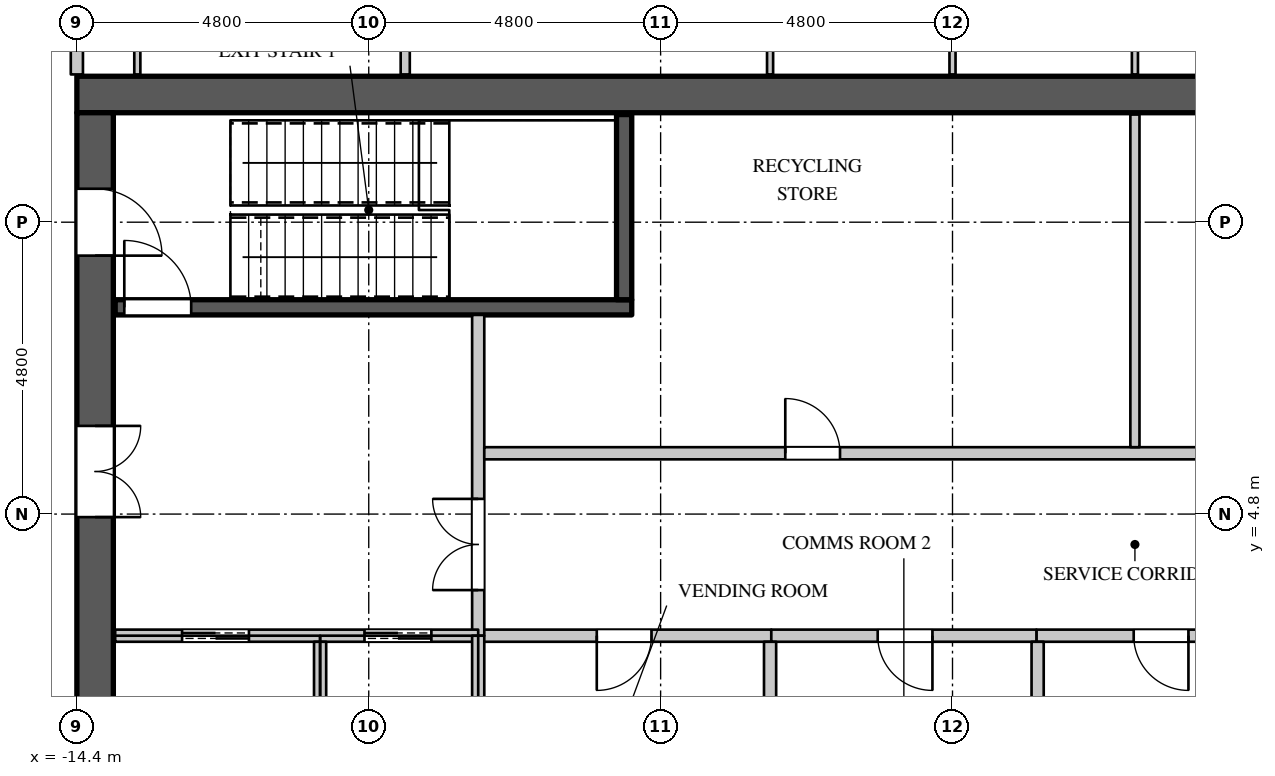
"""IFC4 building model, lengths in metres.
Left out: names, types, materials, properties, quantities, classifications, styles, units other than length and angle.
Written with IfcOpenShell. Run it as: python <this file> out.ifc"""

import sys

from ifc_helpers import new_model, si_unit, direction, frame, frame_2d, origin, place, context, subcontext, project, spatial, rectangle, extrude, element, fill, save


model = new_model("IFC4")
c1 = context("Model", 3, precision=1e-05, world=origin(), true_north=direction((0.0, 1.0)))
c2 = subcontext(c1, "Body", "Model", "MODEL_VIEW")
j1 = project(units=[si_unit("LENGTHUNIT", "METRE"), si_unit("PLANEANGLEUNIT", "RADIAN")], contexts=[c1])
p1 = place(None, origin())
s1 = spatial("IfcSite", under=j1, at=p1, CompositionType="ELEMENT")
p2 = place(p1, origin())
s2 = spatial("IfcBuilding", under=s1, at=p2, CompositionType="ELEMENT")
p3 = place(p2, frame((0.0, 0.0, 213.9)))
s3 = spatial("IfcBuildingStorey", under=s2, at=p3, CompositionType="ELEMENT", Elevation=213.9)
p4 = place(p3, frame((-14.4, 11.7, 0.0), z_axis=(0.0, 0.0, 1.0), x_axis=(1.0, 0.0, 0.0)))
e1 = element("IfcWall", 1, at=p4, inside=s3, PredefinedType="SHEAR", context=c2, shape_type="SweptSolid", body=[
    extrude(rectangle(XDim=28.8, YDim=0.6, at=frame_2d((14.4, 0.0))), origin(), (0.0, 0.0, 1.0), 4.2),
])
p5 = place(p3, frame((-14.1, -11.4, 0.0), z_axis=(0.0, 0.0, 1.0), x_axis=(0.0, 1.0, 0.0)))
e2 = element("IfcWall", 2, at=p5, inside=s3, PredefinedType="SHEAR", context=c2, shape_type="SweptSolid", body=[
    extrude(rectangle(XDim=22.8, YDim=0.6, at=frame_2d((11.4, 0.0))), origin(), (0.0, 0.0, 1.0), 4.2),
])
p6 = place(p5, frame((20.45, 0.0, 0.0)))
e3 = element("IfcOpeningElement", 3, at=p6, cuts=e2, PredefinedType="OPENING", context=c2, shape_type="SweptSolid", body=[
    extrude(rectangle(XDim=1.1, YDim=2.2, at=frame_2d((0.55, 1.1))), frame((0.0, 0.31, 0.0), z_axis=(0.0, -1.0, 0.0), x_axis=(1.0, 0.0, 0.0)), (0.0, 0.0, 1.0), 0.62),
])
p7 = place(p5, frame((1.25, 0.0, 0.0)))
e4 = element("IfcOpeningElement", 4, at=p7, cuts=e2, PredefinedType="OPENING", context=c2, shape_type="SweptSolid", body=[
    extrude(rectangle(XDim=1.1, YDim=2.2, at=frame_2d((0.55, 1.1))), frame((0.0, 0.31, 0.0), z_axis=(0.0, -1.0, 0.0), x_axis=(1.0, 0.0, 0.0)), (0.0, 0.0, 1.0), 0.62),
])
p8 = place(p5, frame((16.15, 0.0, 0.0)))
e5 = element("IfcOpeningElement", 5, at=p8, cuts=e2, PredefinedType="OPENING", context=c2, shape_type="SweptSolid", body=[
    extrude(rectangle(XDim=1.5, YDim=2.4, at=frame_2d((0.75, 1.2))), frame((0.0, 0.31, 0.0), z_axis=(0.0, -1.0, 0.0), x_axis=(1.0, 0.0, 0.0)), (0.0, 0.0, 1.0), 0.62),
])
p9 = place(p5, frame((5.15, 0.0, 0.0)))
e6 = element("IfcOpeningElement", 6, at=p9, cuts=e2, PredefinedType="OPENING", context=c2, shape_type="SweptSolid", body=[
    extrude(rectangle(XDim=1.5, YDim=2.4, at=frame_2d((0.75, 1.2))), frame((0.0, 0.31, 0.0), z_axis=(0.0, -1.0, 0.0), x_axis=(1.0, 0.0, 0.0)), (0.0, 0.0, 1.0), 0.62),
])
p10 = place(p3, frame((-14.4, 12.03, 0.0), z_axis=(0.0, 0.0, 1.0), x_axis=(0.0, 1.0, 0.0)))
e7 = element("IfcWall", 7, at=p10, inside=s3, PredefinedType="PARTITIONING", context=c2, shape_type="SweptSolid", body=[
    extrude(rectangle(XDim=2.27, YDim=0.2, at=frame_2d((1.135, 0.0))), origin(), (0.0, 0.0, 1.0), 3.95),
])
p11 = place(p3, frame((-7.8, 2.8, 0.0), z_axis=(0.0, 0.0, 1.0), x_axis=(1.0, 0.0, 0.0)))
e8 = element("IfcWall", 8, at=p11, inside=s3, PredefinedType="PARTITIONING", context=c2, shape_type="SweptSolid", body=[
    extrude(rectangle(XDim=4.82, YDim=0.2, at=frame_2d((2.41, 0.0))), origin(), (0.0, 0.0, 1.0), 3.95),
])
p12 = place(p11, frame((1.95, 0.0, 0.0)))
e9 = element("IfcOpeningElement", 9, at=p12, cuts=e8, PredefinedType="OPENING", context=c2, shape_type="SweptSolid", body=[
    extrude(rectangle(XDim=0.9, YDim=2.2, at=frame_2d((0.45, 1.1))), frame((0.0, 0.11, 0.0), z_axis=(0.0, -1.0, 0.0), x_axis=(1.0, 0.0, 0.0)), (0.0, 0.0, 1.0), 0.22),
])
p13 = place(p3, frame((-7.8, 2.8, 0.0), z_axis=(0.0, 0.0, 1.0), x_axis=(0.0, 1.0, 0.0)))
e10 = element("IfcWall", 10, at=p13, inside=s3, PredefinedType="PARTITIONING", context=c2, shape_type="SweptSolid", body=[
    extrude(rectangle(XDim=5.275, YDim=0.2, at=frame_2d((2.637, 0.0))), origin(), (0.0, 0.0, 1.0), 3.95),
])
p14 = place(p13, frame((0.75, 0.0, 0.0)))
e11 = element("IfcOpeningElement", 11, at=p14, cuts=e10, PredefinedType="OPENING", context=c2, shape_type="SweptSolid", body=[
    extrude(rectangle(XDim=1.5, YDim=2.4, at=frame_2d((0.75, 1.2))), frame((0.0, 0.11, 0.0), z_axis=(0.0, -1.0, 0.0), x_axis=(1.0, 0.0, 0.0)), (0.0, 0.0, 1.0), 0.22),
])
p15 = place(p3, frame((-7.7, 5.8, 0.0), z_axis=(0.0, 0.0, 1.0), x_axis=(1.0, 0.0, 0.0)))
e12 = element("IfcWall", 12, at=p15, inside=s3, PredefinedType="PARTITIONING", context=c2, shape_type="SweptSolid", body=[
    extrude(rectangle(XDim=21.47, YDim=0.2, at=frame_2d((10.735, 0.0))), origin(), (0.0, 0.0, 1.0), 3.95),
])
p16 = place(p15, frame((4.95, 0.0, 0.0)))
e13 = element("IfcOpeningElement", 13, at=p16, cuts=e12, PredefinedType="OPENING", context=c2, shape_type="SweptSolid", body=[
    extrude(rectangle(XDim=0.9, YDim=2.2, at=frame_2d((0.45, 1.1))), frame((0.0, 0.11, 0.0), z_axis=(0.0, -1.0, 0.0), x_axis=(1.0, 0.0, 0.0)), (0.0, 0.0, 1.0), 0.22),
])
p17 = place(p15, frame((15.55, 0.0, 0.0)))
e14 = element("IfcOpeningElement", 14, at=p17, cuts=e12, PredefinedType="OPENING", context=c2, shape_type="SweptSolid", body=[
    extrude(rectangle(XDim=0.9, YDim=2.2, at=frame_2d((0.45, 1.1))), frame((0.0, 0.11, 0.0), z_axis=(0.0, -1.0, 0.0), x_axis=(1.0, 0.0, 0.0)), (0.0, 0.0, 1.0), 0.22),
])
p18 = place(p3, frame((1.38, 2.8, 0.0), z_axis=(0.0, 0.0, 1.0), x_axis=(1.0, 0.0, 0.0)))
e15 = element("IfcWall", 15, at=p18, inside=s3, PredefinedType="PARTITIONING", context=c2, shape_type="SweptSolid", body=[
    extrude(rectangle(XDim=9.04, YDim=0.2, at=frame_2d((4.52, 0.0))), origin(), (0.0, 0.0, 1.0), 3.95),
])
p19 = place(p18, frame((1.6, 0.0, 0.0)))
e16 = element("IfcOpeningElement", 16, at=p19, cuts=e15, PredefinedType="OPENING", context=c2, shape_type="SweptSolid", body=[
    extrude(rectangle(XDim=0.9, YDim=2.2, at=frame_2d((0.45, 1.1))), frame((0.0, 0.11, 0.0), z_axis=(0.0, -1.0, 0.0), x_axis=(1.0, 0.0, 0.0)), (0.0, 0.0, 1.0), 0.22),
])
p20 = place(p18, frame((6.0, 0.0, 0.0)))
e17 = element("IfcOpeningElement", 17, at=p20, cuts=e15, PredefinedType="OPENING", context=c2, shape_type="SweptSolid", body=[
    extrude(rectangle(XDim=0.9, YDim=2.2, at=frame_2d((0.45, 1.1))), frame((0.0, 0.11, 0.0), z_axis=(0.0, -1.0, 0.0), x_axis=(1.0, 0.0, 0.0)), (0.0, 0.0, 1.0), 0.22),
])
p21 = place(p3, frame((-9.0, 12.03, 0.0), z_axis=(0.0, 0.0, 1.0), x_axis=(0.0, 1.0, 0.0)))
e18 = element("IfcWall", 18, at=p21, inside=s3, PredefinedType="PARTITIONING", context=c2, shape_type="SweptSolid", body=[
    extrude(rectangle(XDim=6.395, YDim=0.15, at=frame_2d((3.198, 0.0))), origin(), (0.0, 0.0, 1.0), 3.95),
])
p22 = place(p3, frame((3.0, 5.9, 0.0), z_axis=(0.0, 0.0, 1.0), x_axis=(0.0, 1.0, 0.0)))
e19 = element("IfcWall", 19, at=p22, inside=s3, PredefinedType="PARTITIONING", context=c2, shape_type="SweptSolid", body=[
    extrude(rectangle(XDim=5.47, YDim=0.15, at=frame_2d((2.735, 0.0))), origin(), (0.0, 0.0, 1.0), 3.95),
])
p23 = place(p3, frame((-2.98, 2.8, 0.0), z_axis=(0.0, 0.0, 1.0), x_axis=(1.0, 0.0, 0.0)))
e20 = element("IfcWall", 20, at=p23, inside=s3, PredefinedType="PARTITIONING", context=c2, shape_type="SweptSolid", body=[
    extrude(rectangle(XDim=4.36, YDim=0.2, at=frame_2d((2.18, 0.0))), origin(), (0.0, 0.0, 1.0), 3.95),
])
p24 = place(p23, frame((1.75, 0.0, 0.0)))
e21 = element("IfcOpeningElement", 21, at=p24, cuts=e20, PredefinedType="OPENING", context=c2, shape_type="SweptSolid", body=[
    extrude(rectangle(XDim=0.9, YDim=2.2, at=frame_2d((0.45, 1.1))), frame((0.0, 0.11, 0.0), z_axis=(0.0, -1.0, 0.0), x_axis=(1.0, 0.0, 0.0)), (0.0, 0.0, 1.0), 0.22),
])
for number, where, z_axis, x_axis in (
    (22, (-3.0, 0.1, 0.0), (0.0, 0.0, 1.0), (0.0, 1.0, 0.0)),
    (23, (1.4, 0.1, 0.0), (0.0, 0.0, 1.0), (0.0, 1.0, 0.0)),
):
    element("IfcWall", number, at=place(p3, frame(where, z_axis=z_axis, x_axis=x_axis)), inside=s3, PredefinedType="PARTITIONING", context=c2, shape_type="SweptSolid", body=[
        extrude(rectangle(XDim=2.6, YDim=0.2, at=frame_2d((1.3, 0.0))), origin(), (0.0, 0.0, 1.0), 3.95),
    ])
p25 = place(p3, frame((-13.77, 2.8, 0.0), z_axis=(0.0, 0.0, 1.0), x_axis=(1.0, 0.0, 0.0)))
e24 = element("IfcWall", 24, at=p25, inside=s3, PredefinedType="PARTITIONING", context=c2, shape_type="SweptSolid", body=[
    extrude(rectangle(XDim=5.97, YDim=0.2, at=frame_2d((2.985, 0.0))), origin(), (0.0, 0.0, 1.0), 3.95),
])
p26 = place(p25, frame((1.1, 0.0, 0.0)))
e25 = element("IfcOpeningElement", 25, at=p26, cuts=e24, PredefinedType="OPENING", context=c2, shape_type="SweptSolid", body=[
    extrude(rectangle(XDim=1.1, YDim=2.2, at=frame_2d((0.55, 1.1))), frame((0.0, 0.11, 0.0), z_axis=(0.0, -1.0, 0.0), x_axis=(1.0, 0.0, 0.0)), (0.0, 0.0, 1.0), 0.22),
])
p27 = place(p25, frame((4.1, 0.0, 0.0)))
e26 = element("IfcOpeningElement", 26, at=p27, cuts=e24, PredefinedType="OPENING", context=c2, shape_type="SweptSolid", body=[
    extrude(rectangle(XDim=1.1, YDim=2.2, at=frame_2d((0.55, 1.1))), frame((0.0, 0.11, 0.0), z_axis=(0.0, -1.0, 0.0), x_axis=(1.0, 0.0, 0.0)), (0.0, 0.0, 1.0), 0.22),
])
p28 = place(p3, frame((-10.4, 0.0, 0.0), z_axis=(0.0, 0.0, 1.0), x_axis=(0.0, 1.0, 0.0)))
e27 = element("IfcWall", 27, at=p28, inside=s3, PredefinedType="PARTITIONING", context=c2, shape_type="SweptSolid", body=[
    extrude(rectangle(XDim=2.7, YDim=0.2, at=frame_2d((1.35, 0.0))), origin(), (0.0, 0.0, 1.0), 3.95),
])
p29 = place(p3, frame((-7.8, 0.0, 0.0), z_axis=(0.0, 0.0, 1.0), x_axis=(0.0, 1.0, 0.0)))
e28 = element("IfcWall", 28, at=p29, inside=s3, PredefinedType="PARTITIONING", context=c2, shape_type="SweptSolid", body=[
    extrude(rectangle(XDim=2.8, YDim=0.2, at=frame_2d((1.4, 0.0))), origin(), (0.0, 0.0, 1.0), 3.95),
])
p30 = place(p3, frame((-13.77, 8.2, 0.0), z_axis=(0.0, 0.0, 1.0), x_axis=(1.0, 0.0, 0.0)))
e29 = element("IfcWall", 29, at=p30, inside=s3, PredefinedType="SHEAR", context=c2, shape_type="SweptSolid", body=[
    extrude(rectangle(XDim=8.495, YDim=0.25, at=frame_2d((4.248, 0.0))), origin(), (0.0, 0.0, 1.0), 3.95),
])
p31 = place(p30, frame((0.15, 0.0, 0.0)))
e30 = element("IfcOpeningElement", 30, at=p31, cuts=e29, PredefinedType="OPENING", context=c2, shape_type="SweptSolid", body=[
    extrude(rectangle(XDim=1.1, YDim=2.2, at=frame_2d((0.55, 1.1))), frame((0.0, 0.135, 0.0), z_axis=(0.0, -1.0, 0.0), x_axis=(1.0, 0.0, 0.0)), (0.0, 0.0, 1.0), 0.27),
])
p32 = place(p3, frame((-5.4, 8.325, 0.0), z_axis=(0.0, 0.0, 1.0), x_axis=(0.0, 1.0, 0.0)))
e31 = element("IfcWall", 31, at=p32, inside=s3, PredefinedType="SHEAR", context=c2, shape_type="SweptSolid", body=[
    extrude(rectangle(XDim=3.045, YDim=0.25, at=frame_2d((1.522, 0.0))), origin(), (0.0, 0.0, 1.0), 3.95),
])
p33 = place(p3, frame((-13.406, 12.03, 0.0), z_axis=(0.0, 0.0, 1.0), x_axis=(0.0, 1.0, 0.0)))
e32 = element("IfcWall", 32, at=p33, inside=s3, PredefinedType="PARTITIONING", context=c2, shape_type="SweptSolid", body=[
    extrude(rectangle(XDim=4.57, YDim=0.1, at=frame_2d((2.285, 0.0))), origin(), (0.0, 0.0, 1.0), 3.3),
])
p34 = place(p3, frame((-3.0, 12.03, 0.0), z_axis=(0.0, 0.0, 1.0), x_axis=(0.0, 1.0, 0.0)))
e33 = element("IfcWall", 33, at=p34, inside=s3, PredefinedType="PARTITIONING", context=c2, shape_type="SweptSolid", body=[
    extrude(rectangle(XDim=6.42, YDim=0.1, at=frame_2d((3.21, 0.0))), origin(), (0.0, 0.0, 1.0), 3.95),
])
p35 = place(p34, frame((2.75, 0.0, 0.0)))
e34 = element("IfcOpeningElement", 34, at=p35, cuts=e33, PredefinedType="OPENING", context=c2, shape_type="SweptSolid", body=[
    extrude(rectangle(XDim=0.9, YDim=2.2, at=frame_2d((0.45, 1.1))), frame((0.0, 0.06, 0.0), z_axis=(0.0, -1.0, 0.0), x_axis=(1.0, 0.0, 0.0)), (0.0, 0.0, 1.0), 0.12),
])
p36 = place(p3, frame((0.0, 12.03, 0.0), z_axis=(0.0, 0.0, 1.0), x_axis=(0.0, 1.0, 0.0)))
e35 = element("IfcWall", 35, at=p36, inside=s3, PredefinedType="PARTITIONING", context=c2, shape_type="SweptSolid", body=[
    extrude(rectangle(XDim=6.395, YDim=0.1, at=frame_2d((3.198, 0.0))), origin(), (0.0, 0.0, 1.0), 3.95),
])
p37 = place(p36, frame((2.75, 0.0, 0.0)))
e36 = element("IfcOpeningElement", 36, at=p37, cuts=e35, PredefinedType="OPENING", context=c2, shape_type="SweptSolid", body=[
    extrude(rectangle(XDim=0.9, YDim=2.2, at=frame_2d((0.45, 1.1))), frame((0.0, 0.06, 0.0), z_axis=(0.0, -1.0, 0.0), x_axis=(1.0, 0.0, 0.0)), (0.0, 0.0, 1.0), 0.12),
])
p38 = place(p3, frame((3.0, 12.03, 0.0), z_axis=(0.0, 0.0, 1.0), x_axis=(0.0, 1.0, 0.0)))
e37 = element("IfcWall", 37, at=p38, inside=s3, PredefinedType="PARTITIONING", context=c2, shape_type="SweptSolid", body=[
    extrude(rectangle(XDim=6.42, YDim=0.1, at=frame_2d((3.21, 0.0))), origin(), (0.0, 0.0, 1.0), 3.95),
])
p39 = place(p16, origin())
e38 = element("IfcDoor", 38, at=p39, inside=s3, OperationType="SINGLE_SWING_LEFT", PredefinedType="DOOR", context=c2, shape_type="SweptSolid", body=[
    extrude(rectangle(XDim=0.9, YDim=2.2, at=frame_2d((0.45, 1.1))), frame((0.0, 0.025, 0.0), z_axis=(0.0, -1.0, 0.0), x_axis=(1.0, 0.0, 0.0)), (0.0, 0.0, 1.0), 0.05),
])
fill(e13, e38)
p40 = place(p12, origin())
e39 = element("IfcDoor", 39, at=p40, inside=s3, OperationType="SINGLE_SWING_RIGHT", PredefinedType="DOOR", context=c2, shape_type="SweptSolid", body=[
    extrude(rectangle(XDim=0.9, YDim=2.2, at=frame_2d((0.45, 1.1))), frame((0.0, 0.025, 0.0), z_axis=(0.0, -1.0, 0.0), x_axis=(1.0, 0.0, 0.0)), (0.0, 0.0, 1.0), 0.05),
])
fill(e9, e39)
p41 = place(p24, origin())
e40 = element("IfcDoor", 40, at=p41, inside=s3, OperationType="SINGLE_SWING_LEFT", PredefinedType="DOOR", context=c2, shape_type="SweptSolid", body=[
    extrude(rectangle(XDim=0.9, YDim=2.2, at=frame_2d((0.45, 1.1))), frame((0.0, 0.025, 0.0), z_axis=(0.0, -1.0, 0.0), x_axis=(1.0, 0.0, 0.0)), (0.0, 0.0, 1.0), 0.05),
])
fill(e21, e40)
p42 = place(p19, origin())
e41 = element("IfcDoor", 41, at=p42, inside=s3, OperationType="SINGLE_SWING_LEFT", PredefinedType="DOOR", context=c2, shape_type="SweptSolid", body=[
    extrude(rectangle(XDim=0.9, YDim=2.2, at=frame_2d((0.45, 1.1))), frame((0.0, 0.025, 0.0), z_axis=(0.0, -1.0, 0.0), x_axis=(1.0, 0.0, 0.0)), (0.0, 0.0, 1.0), 0.05),
])
fill(e16, e41)
p43 = place(p26, origin())
e42 = element("IfcDoor", 42, at=p43, inside=s3, OperationType="DOUBLE_DOOR_SLIDING", PredefinedType="DOOR", context=c2, shape_type="SweptSolid", body=[
    extrude(rectangle(XDim=1.1, YDim=2.2, at=frame_2d((0.55, 1.1))), frame((0.0, 0.025, 0.0), z_axis=(0.0, -1.0, 0.0), x_axis=(1.0, 0.0, 0.0)), (0.0, 0.0, 1.0), 0.05),
])
fill(e25, e42)
p44 = place(p27, origin())
e43 = element("IfcDoor", 43, at=p44, inside=s3, OperationType="DOUBLE_DOOR_SLIDING", PredefinedType="DOOR", context=c2, shape_type="SweptSolid", body=[
    extrude(rectangle(XDim=1.1, YDim=2.2, at=frame_2d((0.55, 1.1))), frame((0.0, 0.025, 0.0), z_axis=(0.0, -1.0, 0.0), x_axis=(1.0, 0.0, 0.0)), (0.0, 0.0, 1.0), 0.05),
])
fill(e26, e43)
p45 = place(p31, origin())
e44 = element("IfcDoor", 44, at=p45, inside=s3, OperationType="SINGLE_SWING_LEFT", PredefinedType="DOOR", context=c2, shape_type="SweptSolid", body=[
    extrude(rectangle(XDim=1.1, YDim=2.2, at=frame_2d((0.55, 1.1))), frame((0.0, 0.025, 0.0), z_axis=(0.0, -1.0, 0.0), x_axis=(1.0, 0.0, 0.0)), (0.0, 0.0, 1.0), 0.05),
])
fill(e30, e44)
p46 = place(p14, origin())
e45 = element("IfcDoor", 45, at=p46, inside=s3, OperationType="DOUBLE_DOOR_SINGLE_SWING", PredefinedType="DOOR", context=c2, shape_type="SweptSolid", body=[
    extrude(rectangle(XDim=1.5, YDim=2.4, at=frame_2d((0.75, 1.2))), frame((0.0, 0.025, 0.0), z_axis=(0.0, -1.0, 0.0), x_axis=(1.0, 0.0, 0.0)), (0.0, 0.0, 1.0), 0.05),
])
fill(e11, e45)
p47 = place(p6, origin())
e46 = element("IfcDoor", 46, at=p47, inside=s3, OperationType="SINGLE_SWING_RIGHT", PredefinedType="DOOR", context=c2, shape_type="SweptSolid", body=[
    extrude(rectangle(XDim=1.1, YDim=2.2, at=frame_2d((0.55, 1.1))), frame((0.0, -0.245, 0.0), z_axis=(0.0, -1.0, 0.0), x_axis=(1.0, 0.0, 0.0)), (0.0, 0.0, 1.0), 0.05),
])
fill(e3, e46)
p48 = place(p8, origin())
e47 = element("IfcDoor", 47, at=p48, inside=s3, OperationType="DOUBLE_DOOR_SINGLE_SWING", PredefinedType="DOOR", context=c2, shape_type="SweptSolid", body=[
    extrude(rectangle(XDim=1.5, YDim=2.4, at=frame_2d((0.75, 1.2))), frame((0.0, -0.245, 0.0), z_axis=(0.0, -1.0, 0.0), x_axis=(1.0, 0.0, 0.0)), (0.0, 0.0, 1.0), 0.05),
])
fill(e5, e47)
save(model, sys.argv[1])
